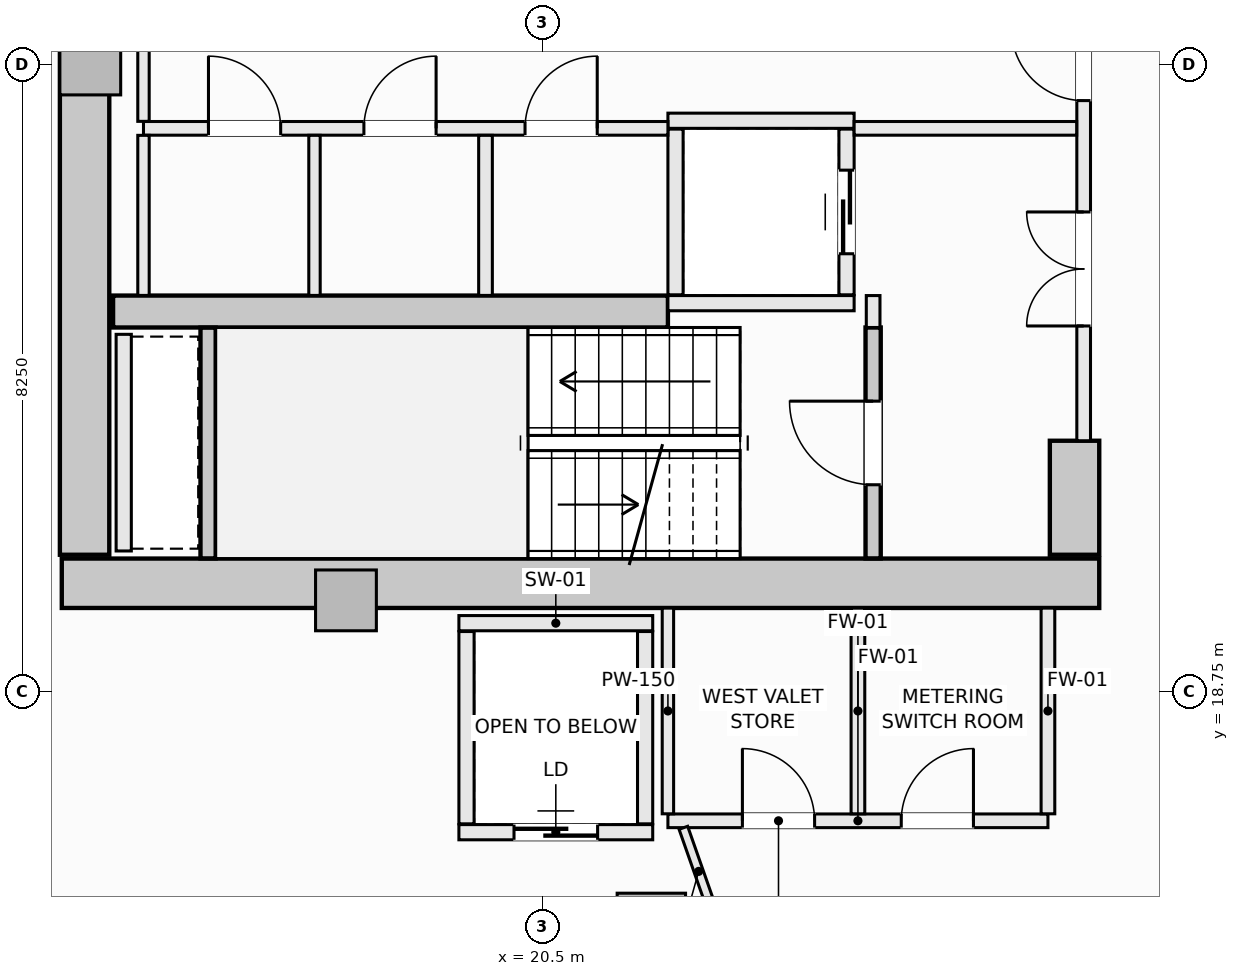
"""IFC4 building model, lengths in metres.
Left out: names, types, materials, properties, quantities, classifications, styles, units other than length and angle.
Written with IfcOpenShell. Run it as: python <this file> out.ifc"""

import sys

from ifc_helpers import new_model, si_unit, direction, frame, frame_2d, origin, origin_2d, place, context, subcontext, project, spatial, rectangle, extrude, element, fill, save


model = new_model("IFC4")
c1 = context("Model", 3, precision=1e-05, world=origin(), true_north=direction((0.0, 1.0)))
c2 = subcontext(c1, "Body", "Model", "MODEL_VIEW")
j1 = project(units=[si_unit("LENGTHUNIT", "METRE"), si_unit("PLANEANGLEUNIT", "RADIAN")], contexts=[c1])
p1 = place(None, origin())
s1 = spatial("IfcSite", under=j1, at=p1, CompositionType="ELEMENT")
p2 = place(p1, origin())
s2 = spatial("IfcBuilding", under=s1, at=p2, CompositionType="ELEMENT")
p3 = place(p2, frame((0.0, 0.0, 108.7)))
s3 = spatial("IfcBuildingStorey", under=s2, at=p3, CompositionType="ELEMENT", Elevation=108.7)
p4 = place(p3, frame((14.175, 20.175, -0.27), z_axis=(0.0, 0.0, 1.0), x_axis=(1.0, 0.0, 0.0)))
e1 = element("IfcWall", 1, at=p4, inside=s3, PredefinedType="SHEAR", context=c2, shape_type="SweptSolid", body=[
    extrude(rectangle(XDim=13.65, YDim=0.65, at=frame_2d((6.825, 0.0))), origin(), (0.0, 0.0, 1.0), 3.4),
])
p5 = place(p3, frame((14.475, 20.55, -0.27), z_axis=(0.0, 0.0, 1.0), x_axis=(0.0, 1.0, 0.0)))
e2 = element("IfcWall", 2, at=p5, inside=s3, PredefinedType="SHEAR", context=c2, shape_type="SweptSolid", body=[
    extrude(rectangle(XDim=12.9, YDim=0.65, at=frame_2d((6.45, 0.0))), origin(), (0.0, 0.0, 1.0), 3.4),
])
p6 = place(p3, frame((27.5, 20.55, -0.27), z_axis=(0.0, 0.0, 1.0), x_axis=(0.0, 1.0, 0.0)))
e3 = element("IfcWall", 3, at=p6, inside=s3, PredefinedType="SHEAR", context=c2, shape_type="SweptSolid", body=[
    extrude(rectangle(XDim=1.5, YDim=0.65, at=frame_2d((0.75, 0.0))), origin(), (0.0, 0.0, 1.0), 3.4),
])
p7 = place(p3, frame((14.85, 23.75, -0.27), z_axis=(0.0, 0.0, 1.0), x_axis=(1.0, 0.0, 0.0)))
e4 = element("IfcWall", 4, at=p7, inside=s3, PredefinedType="SHEAR", context=c2, shape_type="SweptSolid", body=[
    extrude(rectangle(XDim=7.3, YDim=0.42, at=frame_2d((3.65, 0.0))), origin(), (0.0, 0.0, 1.0), 3.4),
])
p8 = place(p3, frame((21.932, 15.648, -0.27), z_axis=(0.0, 0.0, 1.0), x_axis=(1.0, 0.0, 0.0)))
e5 = element("IfcColumn", 5, at=p8, inside=s3, PredefinedType="COLUMN", context=c2, shape_type="SweptSolid", body=[
    extrude(rectangle(XDim=0.9, YDim=0.9, at=origin_2d()), origin(), (0.0, 0.0, 1.0), 3.4),
])
for number, where, z_axis, x_axis in (
    (6, (14.55, 27.0, -0.27), (0.0, 0.0, 1.0), (1.0, 0.0, 0.0)),
    (7, (17.914, 19.95, -0.27), (0.0, 0.0, 1.0), (1.0, 0.0, 0.0)),
):
    element("IfcColumn", number, at=place(p3, frame(where, z_axis=z_axis, x_axis=x_axis)), inside=s3, PredefinedType="PILASTER", context=c2, shape_type="SweptSolid", body=[
        extrude(rectangle(XDim=0.8, YDim=0.8, at=origin_2d()), origin(), (0.0, 0.0, 1.0), 3.4),
    ])
p9 = place(p3, frame((24.85, 20.502, -0.27), z_axis=(0.0, 0.0, 1.0), x_axis=(0.0, 1.0, 0.0)))
e8 = element("IfcWall", 8, at=p9, inside=s3, PredefinedType="SHEAR", context=c2, shape_type="SweptSolid", body=[
    extrude(rectangle(XDim=3.038, YDim=0.2, at=frame_2d((1.519, 0.0))), origin(), (0.0, 0.0, 1.0), 3.4),
])
p10 = place(p9, frame((0.969, 0.0, 0.27)))
e9 = element("IfcOpeningElement", 9, at=p10, cuts=e8, PredefinedType="OPENING", context=c2, shape_type="SweptSolid", body=[
    extrude(rectangle(XDim=1.1, YDim=2.15, at=frame_2d((0.55, 1.075))), frame((0.0, 0.11, 0.0), z_axis=(0.0, -1.0, 0.0), x_axis=(1.0, 0.0, 0.0)), (0.0, 0.0, 1.0), 0.22),
])
p11 = place(p3, frame((16.1, 20.502, -0.27), z_axis=(0.0, 0.0, 1.0), x_axis=(0.0, 1.0, 0.0)))
e10 = element("IfcWall", 10, at=p11, inside=s3, PredefinedType="SHEAR", context=c2, shape_type="SweptSolid", body=[
    extrude(rectangle(XDim=3.036, YDim=0.2, at=frame_2d((1.518, 0.0))), origin(), (0.0, 0.0, 1.0), 3.4),
])
for number, where, z_axis, x_axis in (
    (11, (22.15, 26.26, 0.0), (0.0, 0.0, 1.0), (1.0, 0.0, 0.0)),
    (12, (22.15, 23.86, 0.0), (0.0, 0.0, 1.0), (1.0, 0.0, 0.0)),
):
    element("IfcWall", number, at=place(p3, frame(where, z_axis=z_axis, x_axis=x_axis)), inside=s3, PredefinedType="SOLIDWALL", context=c2, shape_type="SweptSolid", body=[
        extrude(rectangle(XDim=2.45, YDim=0.2, at=frame_2d((1.225, 0.0))), origin(), (0.0, 0.0, 1.0), 3.13),
    ])
p12 = place(p3, frame((22.25, 23.97, 0.0), z_axis=(0.0, 0.0, 1.0), x_axis=(0.0, 1.0, 0.0)))
e13 = element("IfcWall", 13, at=p12, inside=s3, PredefinedType="SOLIDWALL", context=c2, shape_type="SweptSolid", body=[
    extrude(rectangle(XDim=2.18, YDim=0.2, at=frame_2d((1.09, 0.0))), origin(), (0.0, 0.0, 1.0), 3.13),
])
p13 = place(p3, frame((24.5, 23.97, 0.0), z_axis=(0.0, 0.0, 1.0), x_axis=(0.0, 1.0, 0.0)))
e14 = element("IfcWall", 14, at=p13, inside=s3, PredefinedType="SOLIDWALL", context=c2, shape_type="SweptSolid", body=[
    extrude(rectangle(XDim=2.18, YDim=0.2, at=frame_2d((1.09, 0.0))), origin(), (0.0, 0.0, 1.0), 3.13),
])
p14 = place(p13, frame((0.54, 0.0, 0.0)))
e15 = element("IfcOpeningElement", 15, at=p14, cuts=e14, PredefinedType="OPENING", context=c2, shape_type="SweptSolid", body=[
    extrude(rectangle(XDim=1.1, YDim=2.2, at=frame_2d((0.55, 1.1))), frame((0.0, 0.11, 0.0), z_axis=(0.0, -1.0, 0.0), x_axis=(1.0, 0.0, 0.0)), (0.0, 0.0, 1.0), 0.22),
])
p15 = place(p3, frame((19.4, 19.65, 0.0), z_axis=(0.0, 0.0, 1.0), x_axis=(1.0, 0.0, 0.0)))
e16 = element("IfcWall", 16, at=p15, inside=s3, PredefinedType="SOLIDWALL", context=c2, shape_type="SweptSolid", body=[
    extrude(rectangle(XDim=2.55, YDim=0.2, at=frame_2d((1.275, 0.0))), origin(), (0.0, 0.0, 1.0), 3.13),
])
p16 = place(p3, frame((19.4, 16.9, 0.0), z_axis=(0.0, 0.0, 1.0), x_axis=(1.0, 0.0, 0.0)))
e17 = element("IfcWall", 17, at=p16, inside=s3, PredefinedType="SOLIDWALL", context=c2, shape_type="SweptSolid", body=[
    extrude(rectangle(XDim=2.55, YDim=0.2, at=frame_2d((1.275, 0.0))), origin(), (0.0, 0.0, 1.0), 3.13),
])
p17 = place(p16, frame((0.725, 0.0, 0.0)))
e18 = element("IfcOpeningElement", 18, at=p17, cuts=e17, PredefinedType="OPENING", context=c2, shape_type="SweptSolid", body=[
    extrude(rectangle(XDim=1.1, YDim=2.2, at=frame_2d((0.55, 1.1))), frame((0.0, 0.11, 0.0), z_axis=(0.0, -1.0, 0.0), x_axis=(1.0, 0.0, 0.0)), (0.0, 0.0, 1.0), 0.22),
])
for number, where, z_axis, x_axis in (
    (19, (19.5, 17.01, 0.0), (0.0, 0.0, 1.0), (0.0, 1.0, 0.0)),
    (20, (21.85, 17.01, 0.0), (0.0, 0.0, 1.0), (0.0, 1.0, 0.0)),
):
    element("IfcWall", number, at=place(p3, frame(where, z_axis=z_axis, x_axis=x_axis)), inside=s3, PredefinedType="SOLIDWALL", context=c2, shape_type="SweptSolid", body=[
        extrude(rectangle(XDim=2.53, YDim=0.2, at=frame_2d((1.265, 0.0))), origin(), (0.0, 0.0, 1.0), 3.13),
    ])
p18 = place(p3, frame((14.99, 20.6, 0.0), z_axis=(0.0, 0.0, 1.0), x_axis=(0.0, 1.0, 0.0)))
e21 = element("IfcWall", 21, at=p18, inside=s3, PredefinedType="SOLIDWALL", context=c2, shape_type="SweptSolid", body=[
    extrude(rectangle(XDim=2.85, YDim=0.2, at=frame_2d((1.425, 0.0))), origin(), (0.0, 0.0, 1.0), 3.13),
])
p19 = place(p3, frame((24.85, 23.54, 0.0), z_axis=(0.0, 0.0, 1.0), x_axis=(0.0, 1.0, 0.0)))
e22 = element("IfcWall", 22, at=p19, inside=s3, PredefinedType="SOLIDWALL", context=c2, shape_type="SweptSolid", body=[
    extrude(rectangle(XDim=0.42, YDim=0.18, at=frame_2d((0.21, 0.0))), origin(), (0.0, 0.0, 1.0), 3.13),
])
p20 = place(p3, frame((27.62, 22.05, 0.0), z_axis=(0.0, 0.0, 1.0), x_axis=(0.0, 1.0, 0.0)))
e23 = element("IfcWall", 23, at=p20, inside=s3, PredefinedType="SOLIDWALL", context=c2, shape_type="SweptSolid", body=[
    extrude(rectangle(XDim=9.9, YDim=0.18, at=frame_2d((4.95, 0.0))), origin(), (0.0, 0.0, 1.0), 3.13),
])
p21 = place(p20, frame((4.475, 0.0, 0.0)))
e24 = element("IfcOpeningElement", 24, at=p21, cuts=e23, PredefinedType="OPENING", context=c2, shape_type="SweptSolid", body=[
    extrude(rectangle(XDim=0.95, YDim=2.1, at=frame_2d((0.475, 1.05))), frame((0.0, 0.1, 0.0), z_axis=(0.0, -1.0, 0.0), x_axis=(1.0, 0.0, 0.0)), (0.0, 0.0, 1.0), 0.2),
])
p22 = place(p20, frame((6.89, 0.0, 0.0)))
e25 = element("IfcOpeningElement", 25, at=p22, cuts=e23, PredefinedType="OPENING", context=c2, shape_type="SweptSolid", body=[
    extrude(rectangle(XDim=1.5, YDim=2.2, at=frame_2d((0.75, 1.1))), frame((0.0, 0.1, 0.0), z_axis=(0.0, -1.0, 0.0), x_axis=(1.0, 0.0, 0.0)), (0.0, 0.0, 1.0), 0.2),
])
p23 = place(p20, frame((1.51, 0.0, 0.0)))
e26 = element("IfcOpeningElement", 26, at=p23, cuts=e23, PredefinedType="OPENING", context=c2, shape_type="SweptSolid", body=[
    extrude(rectangle(XDim=1.5, YDim=2.2, at=frame_2d((0.75, 1.1))), frame((0.0, 0.1, 0.0), z_axis=(0.0, -1.0, 0.0), x_axis=(1.0, 0.0, 0.0)), (0.0, 0.0, 1.0), 0.2),
])
p24 = place(p3, frame((15.25, 26.16, 0.0), z_axis=(0.0, 0.0, 1.0), x_axis=(1.0, 0.0, 0.0)))
e27 = element("IfcWall", 27, at=p24, inside=s3, PredefinedType="SOLIDWALL", context=c2, shape_type="SweptSolid", body=[
    extrude(rectangle(XDim=6.9, YDim=0.18, at=frame_2d((3.45, 0.0))), origin(), (0.0, 0.0, 1.0), 3.13),
])
p25 = place(p24, frame((5.02, 0.0, 0.0)))
e28 = element("IfcOpeningElement", 28, at=p25, cuts=e27, PredefinedType="OPENING", context=c2, shape_type="SweptSolid", body=[
    extrude(rectangle(XDim=0.95, YDim=2.1, at=frame_2d((0.475, 1.05))), frame((0.0, 0.1, 0.0), z_axis=(0.0, -1.0, 0.0), x_axis=(1.0, 0.0, 0.0)), (0.0, 0.0, 1.0), 0.2),
])
p26 = place(p24, frame((0.855, 0.0, 0.0)))
e29 = element("IfcOpeningElement", 29, at=p26, cuts=e27, PredefinedType="OPENING", context=c2, shape_type="SweptSolid", body=[
    extrude(rectangle(XDim=0.95, YDim=2.1, at=frame_2d((0.475, 1.05))), frame((0.0, 0.1, 0.0), z_axis=(0.0, -1.0, 0.0), x_axis=(1.0, 0.0, 0.0)), (0.0, 0.0, 1.0), 0.2),
])
p27 = place(p24, frame((2.9, 0.0, 0.0)))
e30 = element("IfcOpeningElement", 30, at=p27, cuts=e27, PredefinedType="OPENING", context=c2, shape_type="SweptSolid", body=[
    extrude(rectangle(XDim=0.95, YDim=2.1, at=frame_2d((0.475, 1.05))), frame((0.0, 0.1, 0.0), z_axis=(0.0, -1.0, 0.0), x_axis=(1.0, 0.0, 0.0)), (0.0, 0.0, 1.0), 0.2),
])
p28 = place(p3, frame((24.6, 26.16, 0.0), z_axis=(0.0, 0.0, 1.0), x_axis=(1.0, 0.0, 0.0)))
e31 = element("IfcWall", 31, at=p28, inside=s3, PredefinedType="SOLIDWALL", context=c2, shape_type="SweptSolid", body=[
    extrude(rectangle(XDim=2.928, YDim=0.18, at=frame_2d((1.464, 0.0))), origin(), (0.0, 0.0, 1.0), 3.13),
])
p29 = place(p3, frame((15.25, 23.962, 0.0), z_axis=(0.0, 0.0, 1.0), x_axis=(0.0, 1.0, 0.0)))
e32 = element("IfcWall", 32, at=p29, inside=s3, PredefinedType="PARTITIONING", context=c2, shape_type="SweptSolid", body=[
    extrude(rectangle(XDim=2.106, YDim=0.15, at=frame_2d((1.053, 0.0))), origin(), (0.0, 0.0, 1.0), 3.13),
])
p30 = place(p3, frame((15.25, 26.252, 0.0), z_axis=(0.0, 0.0, 1.0), x_axis=(0.0, 1.0, 0.0)))
e33 = element("IfcWall", 33, at=p30, inside=s3, PredefinedType="PARTITIONING", context=c2, shape_type="SweptSolid", body=[
    extrude(rectangle(XDim=1.496, YDim=0.15, at=frame_2d((0.748, 0.0))), origin(), (0.0, 0.0, 1.0), 3.13),
])
p31 = place(p3, frame((19.75, 23.962, 0.0), z_axis=(0.0, 0.0, 1.0), x_axis=(0.0, 1.0, 0.0)))
e34 = element("IfcWall", 34, at=p31, inside=s3, PredefinedType="SOLIDWALL", context=c2, shape_type="SweptSolid", body=[
    extrude(rectangle(XDim=2.106, YDim=0.18, at=frame_2d((1.053, 0.0))), origin(), (0.0, 0.0, 1.0), 3.13),
])
p32 = place(p3, frame((17.5, 23.962, 0.0), z_axis=(0.0, 0.0, 1.0), x_axis=(0.0, 1.0, 0.0)))
e35 = element("IfcWall", 35, at=p32, inside=s3, PredefinedType="PARTITIONING", context=c2, shape_type="SweptSolid", body=[
    extrude(rectangle(XDim=2.106, YDim=0.15, at=frame_2d((1.053, 0.0))), origin(), (0.0, 0.0, 1.0), 3.13),
])
p33 = place(p3, frame((22.15, 17.05, 0.0), z_axis=(0.0, 0.0, 1.0), x_axis=(1.0, 0.0, 0.0)))
e36 = element("IfcWall", 36, at=p33, inside=s3, PredefinedType="SOLIDWALL", context=c2, shape_type="SweptSolid", body=[
    extrude(rectangle(XDim=5.0, YDim=0.18, at=frame_2d((2.5, 0.0))), origin(), (0.0, 0.0, 1.0), 3.13),
])
p34 = place(p33, frame((0.98, 0.0, 0.0)))
e37 = element("IfcOpeningElement", 37, at=p34, cuts=e36, PredefinedType="OPENING", context=c2, shape_type="SweptSolid", body=[
    extrude(rectangle(XDim=0.95, YDim=2.1, at=frame_2d((0.475, 1.05))), frame((0.0, 0.1, 0.0), z_axis=(0.0, -1.0, 0.0), x_axis=(1.0, 0.0, 0.0)), (0.0, 0.0, 1.0), 0.2),
])
p35 = place(p33, frame((3.07, 0.0, 0.0)))
e38 = element("IfcOpeningElement", 38, at=p35, cuts=e36, PredefinedType="OPENING", context=c2, shape_type="SweptSolid", body=[
    extrude(rectangle(XDim=0.95, YDim=2.1, at=frame_2d((0.475, 1.05))), frame((0.0, 0.1, 0.0), z_axis=(0.0, -1.0, 0.0), x_axis=(1.0, 0.0, 0.0)), (0.0, 0.0, 1.0), 0.2),
])
p36 = place(p3, frame((22.15, 17.142, 0.0), z_axis=(0.0, 0.0, 1.0), x_axis=(0.0, 1.0, 0.0)))
e39 = element("IfcWall", 39, at=p36, inside=s3, PredefinedType="PARTITIONING", context=c2, shape_type="SweptSolid", body=[
    extrude(rectangle(XDim=2.706, YDim=0.15, at=frame_2d((1.353, 0.0))), origin(), (0.0, 0.0, 1.0), 3.13),
])
for number, where, z_axis, x_axis in (
    (40, (24.65, 17.142, 0.0), (0.0, 0.0, 1.0), (0.0, 1.0, 0.0)),
    (41, (27.15, 17.142, 0.0), (0.0, 0.0, 1.0), (0.0, 1.0, 0.0)),
):
    element("IfcWall", number, at=place(p3, frame(where, z_axis=z_axis, x_axis=x_axis)), inside=s3, PredefinedType="SOLIDWALL", context=c2, shape_type="SweptSolid", body=[
        extrude(rectangle(XDim=2.706, YDim=0.18, at=frame_2d((1.353, 0.0))), origin(), (0.0, 0.0, 1.0), 3.13),
    ])
p37 = place(p3, frame((22.353, 16.958, 0.0), z_axis=(0.0, 0.0, 1.0), x_axis=(0.331370038458, -0.943500873138, 0.0)))
e42 = element("IfcWall", 42, at=p37, inside=s3, PredefinedType="PARTITIONING", context=c2, shape_type="SweptSolid", body=[
    extrude(rectangle(XDim=1.216, YDim=0.12, at=frame_2d((0.608, 0.0))), origin(), (0.0, 0.0, 1.0), 3.13),
])
p38 = place(p10, origin())
e43 = element("IfcDoor", 43, at=p38, inside=s3, OperationType="SINGLE_SWING_RIGHT", PredefinedType="DOOR", context=c2, shape_type="SweptSolid", body=[
    extrude(rectangle(XDim=1.1, YDim=2.15, at=frame_2d((0.55, 1.075))), frame((0.0, 0.025, 0.0), z_axis=(0.0, -1.0, 0.0), x_axis=(1.0, 0.0, 0.0)), (0.0, 0.0, 1.0), 0.05),
])
fill(e9, e43)
p39 = place(p14, origin())
e44 = element("IfcDoor", 44, at=p39, inside=s3, OperationType="SLIDING_TO_LEFT", PredefinedType="DOOR", context=c2, shape_type="SweptSolid", body=[
    extrude(rectangle(XDim=1.1, YDim=2.2, at=frame_2d((0.55, 1.1))), frame((0.0, 0.025, 0.0), z_axis=(0.0, -1.0, 0.0), x_axis=(1.0, 0.0, 0.0)), (0.0, 0.0, 1.0), 0.05),
])
fill(e15, e44)
p40 = place(p17, origin())
e45 = element("IfcDoor", 45, at=p40, inside=s3, OperationType="SLIDING_TO_LEFT", PredefinedType="DOOR", context=c2, shape_type="SweptSolid", body=[
    extrude(rectangle(XDim=1.1, YDim=2.2, at=frame_2d((0.55, 1.1))), frame((0.0, 0.025, 0.0), z_axis=(0.0, -1.0, 0.0), x_axis=(1.0, 0.0, 0.0)), (0.0, 0.0, 1.0), 0.05),
])
fill(e18, e45)
p41 = place(p21, origin())
e46 = element("IfcDoor", 46, at=p41, inside=s3, OperationType="SINGLE_SWING_RIGHT", PredefinedType="DOOR", context=c2, shape_type="SweptSolid", body=[
    extrude(rectangle(XDim=0.95, YDim=2.1, at=frame_2d((0.475, 1.05))), frame((0.0, 0.025, 0.0), z_axis=(0.0, -1.0, 0.0), x_axis=(1.0, 0.0, 0.0)), (0.0, 0.0, 1.0), 0.05),
])
fill(e24, e46)
p42 = place(p23, origin())
e47 = element("IfcDoor", 47, at=p42, inside=s3, OperationType="DOUBLE_DOOR_SINGLE_SWING", PredefinedType="DOOR", context=c2, shape_type="SweptSolid", body=[
    extrude(rectangle(XDim=1.5, YDim=2.2, at=frame_2d((0.75, 1.1))), frame((0.0, 0.025, 0.0), z_axis=(0.0, -1.0, 0.0), x_axis=(1.0, 0.0, 0.0)), (0.0, 0.0, 1.0), 0.05),
])
fill(e26, e47)
p43 = place(p25, origin())
e48 = element("IfcDoor", 48, at=p43, inside=s3, OperationType="SINGLE_SWING_RIGHT", PredefinedType="DOOR", context=c2, shape_type="SweptSolid", body=[
    extrude(rectangle(XDim=0.95, YDim=2.1, at=frame_2d((0.475, 1.05))), frame((0.0, 0.025, 0.0), z_axis=(0.0, -1.0, 0.0), x_axis=(1.0, 0.0, 0.0)), (0.0, 0.0, 1.0), 0.05),
])
fill(e28, e48)
p44 = place(p26, origin())
e49 = element("IfcDoor", 49, at=p44, inside=s3, OperationType="SINGLE_SWING_LEFT", PredefinedType="DOOR", context=c2, shape_type="SweptSolid", body=[
    extrude(rectangle(XDim=0.95, YDim=2.1, at=frame_2d((0.475, 1.05))), frame((0.0, 0.025, 0.0), z_axis=(0.0, -1.0, 0.0), x_axis=(1.0, 0.0, 0.0)), (0.0, 0.0, 1.0), 0.05),
])
fill(e29, e49)
p45 = place(p27, origin())
e50 = element("IfcDoor", 50, at=p45, inside=s3, OperationType="SINGLE_SWING_RIGHT", PredefinedType="DOOR", context=c2, shape_type="SweptSolid", body=[
    extrude(rectangle(XDim=0.95, YDim=2.1, at=frame_2d((0.475, 1.05))), frame((0.0, 0.025, 0.0), z_axis=(0.0, -1.0, 0.0), x_axis=(1.0, 0.0, 0.0)), (0.0, 0.0, 1.0), 0.05),
])
fill(e30, e50)
p46 = place(p34, origin())
e51 = element("IfcDoor", 51, at=p46, inside=s3, OperationType="SINGLE_SWING_LEFT", PredefinedType="DOOR", context=c2, shape_type="SweptSolid", body=[
    extrude(rectangle(XDim=0.95, YDim=2.1, at=frame_2d((0.475, 1.05))), frame((0.0, 0.025, 0.0), z_axis=(0.0, -1.0, 0.0), x_axis=(1.0, 0.0, 0.0)), (0.0, 0.0, 1.0), 0.05),
])
fill(e37, e51)
p47 = place(p35, origin())
e52 = element("IfcDoor", 52, at=p47, inside=s3, OperationType="SINGLE_SWING_RIGHT", PredefinedType="DOOR", context=c2, shape_type="SweptSolid", body=[
    extrude(rectangle(XDim=0.95, YDim=2.1, at=frame_2d((0.475, 1.05))), frame((0.0, 0.025, 0.0), z_axis=(0.0, -1.0, 0.0), x_axis=(1.0, 0.0, 0.0)), (0.0, 0.0, 1.0), 0.05),
])
fill(e38, e52)
save(model, sys.argv[1])
